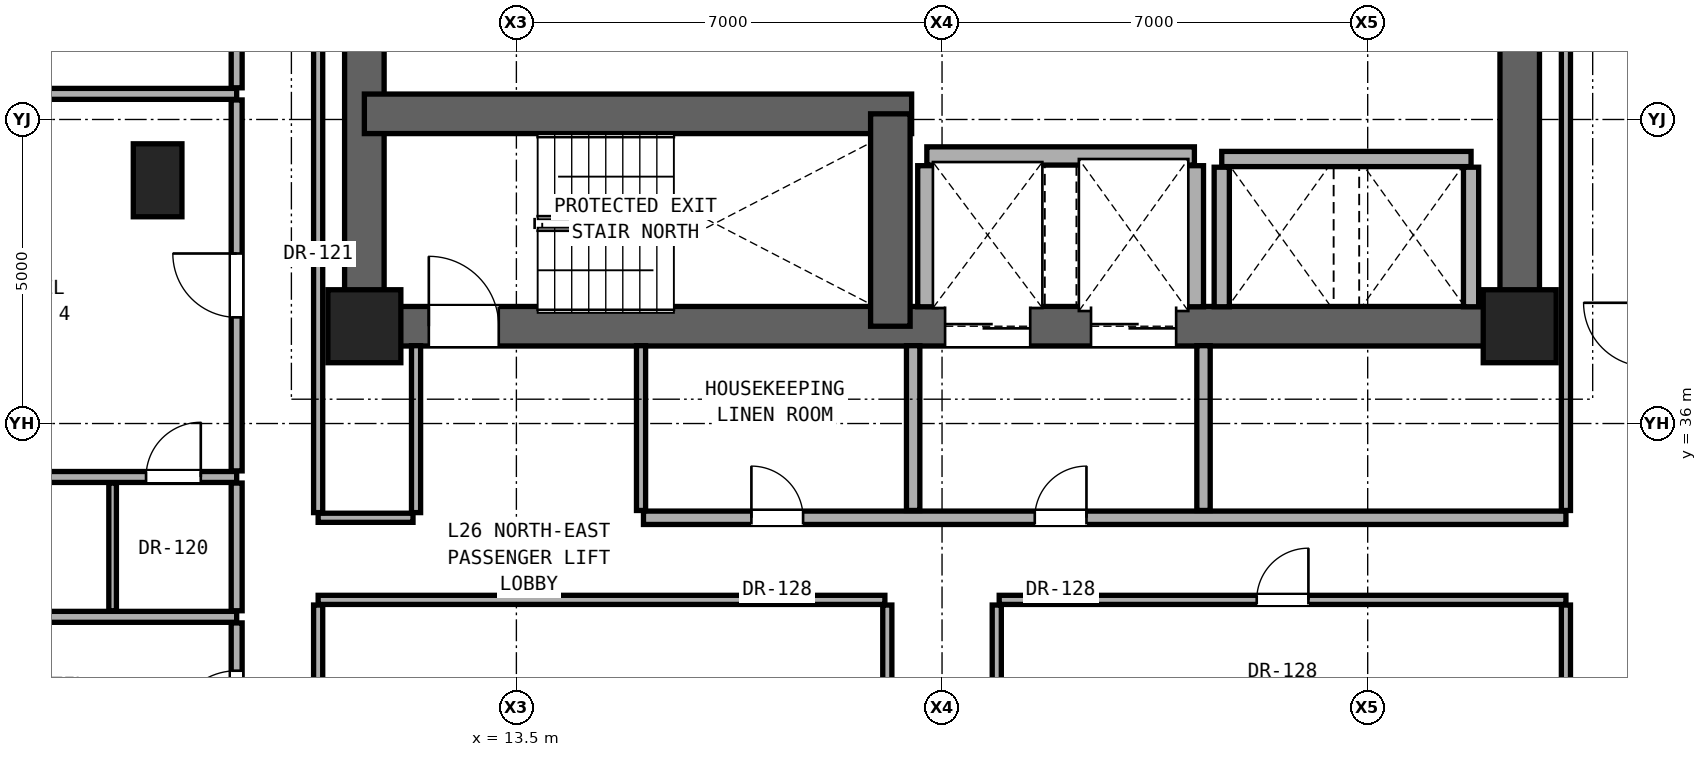
"""IFC4 building model, lengths in metres.
Left out: names, types, materials, properties, quantities, classifications, styles, units other than length and angle.
Written with IfcOpenShell. Run it as: python <this file> out.ifc"""

import sys

from ifc_helpers import new_model, si_unit, direction, frame, frame_2d, origin, origin_2d, place, context, subcontext, project, spatial, rectangle, extrude, element, fill, save


model = new_model("IFC4")
c1 = context("Model", 3, precision=1e-05, world=origin(), true_north=direction((0.0, 1.0)))
c2 = subcontext(c1, "Body", "Model", "MODEL_VIEW")
j1 = project(units=[si_unit("LENGTHUNIT", "METRE"), si_unit("PLANEANGLEUNIT", "RADIAN")], contexts=[c1])
p1 = place(None, origin())
s1 = spatial("IfcSite", under=j1, at=p1, CompositionType="ELEMENT")
p2 = place(p1, origin())
s2 = spatial("IfcBuilding", under=s1, at=p2, CompositionType="ELEMENT")
p3 = place(p2, frame((0.0, 0.0, 95.0)))
s3 = spatial("IfcBuildingStorey", under=s2, at=p3, CompositionType="ELEMENT", Elevation=95.0)
for number, where, z_axis, x_axis in (
    (1, (11.0, 37.6, 0.0), (0.0, 0.0, 1.0), (1.0, 0.0, 0.0)),
    (2, (30.0, 37.6, 0.0), (0.0, 0.0, 1.0), (1.0, 0.0, 0.0)),
):
    element("IfcColumn", number, at=place(p3, frame(where, z_axis=z_axis, x_axis=x_axis)), inside=s3, PredefinedType="COLUMN", context=c2, shape_type="SweptSolid", body=[
        extrude(rectangle(XDim=1.2, YDim=1.2, at=origin_2d()), origin(), (0.0, 0.0, 1.0), 3.3),
    ])
p4 = place(p3, frame((7.6, 40.0, 0.0), z_axis=(0.0, 0.0, 1.0), x_axis=(1.0, 0.0, 0.0)))
e3 = element("IfcColumn", 3, at=p4, inside=s3, PredefinedType="PILASTER", context=c2, shape_type="SweptSolid", body=[
    extrude(rectangle(XDim=0.8, YDim=1.2, at=origin_2d()), origin(), (0.0, 0.0, 1.0), 3.3),
])
for number, where, z_axis, x_axis in (
    (4, (11.0, 37.6, 0.0), (0.0, 0.0, 1.0), (0.0, 1.0, 0.0)),
    (5, (30.0, 37.6, 0.0), (0.0, 0.0, 1.0), (0.0, 1.0, 0.0)),
):
    element("IfcWall", number, at=place(p3, frame(where, z_axis=z_axis, x_axis=x_axis)), inside=s3, PredefinedType="SHEAR", context=c2, shape_type="SweptSolid", body=[
        extrude(rectangle(XDim=6.0, YDim=0.65, at=frame_2d((3.0, 0.0))), origin(), (0.0, 0.0, 1.0), 3.08),
    ])
p5 = place(p3, frame((11.0, 37.6, 0.0), z_axis=(0.0, 0.0, 1.0), x_axis=(1.0, 0.0, 0.0)))
e6 = element("IfcWall", 6, at=p5, inside=s3, PredefinedType="SHEAR", context=c2, shape_type="SweptSolid", body=[
    extrude(rectangle(XDim=19.0, YDim=0.65, at=frame_2d((9.5, 0.0))), origin(), (0.0, 0.0, 1.0), 3.08),
])
p6 = place(p5, frame((1.06, 0.0, 0.0)))
e7 = element("IfcOpeningElement", 7, at=p6, cuts=e6, PredefinedType="OPENING", context=c2, shape_type="SweptSolid", body=[
    extrude(rectangle(XDim=1.15, YDim=2.2, at=frame_2d((0.575, 1.1))), frame((0.0, 0.335, 0.0), z_axis=(0.0, -1.0, 0.0), x_axis=(1.0, 0.0, 0.0)), (0.0, 0.0, 1.0), 0.67),
])
p7 = place(p5, frame((9.55, 0.0, 0.0)))
e8 = element("IfcOpeningElement", 8, at=p7, cuts=e6, PredefinedType="OPENING", context=c2, shape_type="SweptSolid", body=[
    extrude(rectangle(XDim=1.4, YDim=2.35, at=frame_2d((0.7, 1.175))), frame((0.0, 0.335, 0.0), z_axis=(0.0, -1.0, 0.0), x_axis=(1.0, 0.0, 0.0)), (0.0, 0.0, 1.0), 0.67),
])
p8 = place(p5, frame((11.95, 0.0, 0.0)))
e9 = element("IfcOpeningElement", 9, at=p8, cuts=e6, PredefinedType="OPENING", context=c2, shape_type="SweptSolid", body=[
    extrude(rectangle(XDim=1.4, YDim=2.35, at=frame_2d((0.7, 1.175))), frame((0.0, 0.335, 0.0), z_axis=(0.0, -1.0, 0.0), x_axis=(1.0, 0.0, 0.0)), (0.0, 0.0, 1.0), 0.67),
])
p9 = place(p3, frame((11.0, 41.093, 0.0), z_axis=(0.0, 0.0, 1.0), x_axis=(1.0, 0.0, 0.0)))
e10 = element("IfcWall", 10, at=p9, inside=s3, PredefinedType="SHEAR", context=c2, shape_type="SweptSolid", body=[
    extrude(rectangle(XDim=9.0, YDim=0.65, at=frame_2d((4.5, 0.0))), origin(), (0.0, 0.0, 1.0), 3.08),
])
p10 = place(p3, frame((19.65, 37.6, 0.0), z_axis=(0.0, 0.0, 1.0), x_axis=(0.0, 1.0, 0.0)))
e11 = element("IfcWall", 11, at=p10, inside=s3, PredefinedType="SHEAR", context=c2, shape_type="SweptSolid", body=[
    extrude(rectangle(XDim=3.493, YDim=0.65, at=frame_2d((1.747, 0.0))), origin(), (0.0, 0.0, 1.0), 3.08),
])
p11 = place(p3, frame((-0.29, 32.821, 0.0), z_axis=(0.0, 0.0, 1.0), x_axis=(1.0, 0.0, 0.0)))
e12 = element("IfcWall", 12, at=p11, inside=s3, PredefinedType="PARTITIONING", context=c2, shape_type="SweptSolid", body=[
    extrude(rectangle(XDim=9.19, YDim=0.18, at=frame_2d((4.595, 0.0))), origin(), (0.0, 0.0, 1.0), 2.145),
])
p12 = place(p3, frame((10.24, 33.1, 0.0), z_axis=(0.0, 0.0, 1.0), x_axis=(1.0, 0.0, 0.0)))
e13 = element("IfcWall", 13, at=p12, inside=s3, PredefinedType="PARTITIONING", context=c2, shape_type="SweptSolid", body=[
    extrude(rectangle(XDim=9.32, YDim=0.15, at=frame_2d((4.66, 0.0))), origin(), (0.0, 0.0, 1.0), 2.124),
])
p13 = place(p3, frame((21.44, 33.1, 0.0), z_axis=(0.0, 0.0, 1.0), x_axis=(1.0, 0.0, 0.0)))
e14 = element("IfcWall", 14, at=p13, inside=s3, PredefinedType="PARTITIONING", context=c2, shape_type="SweptSolid", body=[
    extrude(rectangle(XDim=9.32, YDim=0.15, at=frame_2d((4.66, 0.0))), origin(), (0.0, 0.0, 1.0), 2.124),
])
p14 = place(p13, frame((4.235, 0.0, 0.0)))
e15 = element("IfcOpeningElement", 15, at=p14, cuts=e14, PredefinedType="OPENING", context=c2, shape_type="SweptSolid", body=[
    extrude(rectangle(XDim=0.85, YDim=2.01, at=frame_2d((0.425, 1.005))), frame((0.0, 0.085, 0.0), z_axis=(0.0, -1.0, 0.0), x_axis=(1.0, 0.0, 0.0)), (0.0, 0.0, 1.0), 0.17),
])
p15 = place(p3, frame((10.24, 34.45, 0.0), z_axis=(0.0, 0.0, 1.0), x_axis=(1.0, 0.0, 0.0)))
e16 = element("IfcWall", 16, at=p15, inside=s3, PredefinedType="PARTITIONING", context=c2, shape_type="SweptSolid", body=[
    extrude(rectangle(XDim=1.56, YDim=0.15, at=frame_2d((0.78, 0.0))), origin(), (0.0, 0.0, 1.0), 2.124),
])
p16 = place(p3, frame((15.59, 34.45, 0.0), z_axis=(0.0, 0.0, 1.0), x_axis=(1.0, 0.0, 0.0)))
e17 = element("IfcWall", 17, at=p16, inside=s3, PredefinedType="SOLIDWALL", context=c2, shape_type="SweptSolid", body=[
    extrude(rectangle(XDim=15.17, YDim=0.22, at=frame_2d((7.585, 0.0))), origin(), (0.0, 0.0, 1.0), 2.124),
])
p17 = place(p16, frame((6.435, 0.0, 0.0)))
e18 = element("IfcOpeningElement", 18, at=p17, cuts=e17, PredefinedType="OPENING", context=c2, shape_type="SweptSolid", body=[
    extrude(rectangle(XDim=0.85, YDim=2.01, at=frame_2d((0.425, 1.005))), frame((0.0, 0.12, 0.0), z_axis=(0.0, -1.0, 0.0), x_axis=(1.0, 0.0, 0.0)), (0.0, 0.0, 1.0), 0.24),
])
p18 = place(p16, frame((1.775, 0.0, 0.0)))
e19 = element("IfcOpeningElement", 19, at=p18, cuts=e17, PredefinedType="OPENING", context=c2, shape_type="SweptSolid", body=[
    extrude(rectangle(XDim=0.85, YDim=2.01, at=frame_2d((0.425, 1.005))), frame((0.0, 0.12, 0.0), z_axis=(0.0, -1.0, 0.0), x_axis=(1.0, 0.0, 0.0)), (0.0, 0.0, 1.0), 0.24),
])
p19 = place(p3, frame((-0.29, 35.121, 0.0), z_axis=(0.0, 0.0, 1.0), x_axis=(1.0, 0.0, 0.0)))
e20 = element("IfcWall", 20, at=p19, inside=s3, PredefinedType="PARTITIONING", context=c2, shape_type="SweptSolid", body=[
    extrude(rectangle(XDim=9.19, YDim=0.18, at=frame_2d((4.595, 0.0))), origin(), (0.0, 0.0, 1.0), 2.145),
])
p20 = place(p19, frame((3.17, 0.0, 0.0)))
e21 = element("IfcOpeningElement", 21, at=p20, cuts=e20, PredefinedType="OPENING", context=c2, shape_type="SweptSolid", body=[
    extrude(rectangle(XDim=0.85, YDim=2.01, at=frame_2d((0.425, 1.005))), frame((0.0, 0.1, 0.0), z_axis=(0.0, -1.0, 0.0), x_axis=(1.0, 0.0, 0.0)), (0.0, 0.0, 1.0), 0.2),
])
p21 = place(p19, frame((7.7, 0.0, 0.0)))
e22 = element("IfcOpeningElement", 22, at=p21, cuts=e20, PredefinedType="OPENING", context=c2, shape_type="SweptSolid", body=[
    extrude(rectangle(XDim=0.9, YDim=2.1, at=frame_2d((0.45, 1.05))), frame((0.0, 0.1, 0.0), z_axis=(0.0, -1.0, 0.0), x_axis=(1.0, 0.0, 0.0)), (0.0, 0.0, 1.0), 0.2),
])
p22 = place(p3, frame((25.1, 40.35, 0.0), z_axis=(0.0, 0.0, 1.0), x_axis=(1.0, 0.0, 0.0)))
e23 = element("IfcWall", 23, at=p22, inside=s3, PredefinedType="SOLIDWALL", context=c2, shape_type="SweptSolid", body=[
    extrude(rectangle(XDim=4.1, YDim=0.25, at=frame_2d((2.05, 0.0))), origin(), (0.0, 0.0, 1.0), 3.08),
])
p23 = place(p3, frame((20.25, 40.4, 0.0), z_axis=(0.0, 0.0, 1.0), x_axis=(1.0, 0.0, 0.0)))
e24 = element("IfcWall", 24, at=p23, inside=s3, PredefinedType="SOLIDWALL", context=c2, shape_type="SweptSolid", body=[
    extrude(rectangle(XDim=4.4, YDim=0.3, at=frame_2d((2.2, 0.0))), origin(), (0.0, 0.0, 1.0), 3.08),
])
p24 = place(p3, frame((5.035, 41.421, 0.0), z_axis=(0.0, 0.0, 1.0), x_axis=(1.0, 0.0, 0.0)))
e25 = element("IfcWall", 25, at=p24, inside=s3, PredefinedType="PARTITIONING", context=c2, shape_type="SweptSolid", body=[
    extrude(rectangle(XDim=3.865, YDim=0.18, at=frame_2d((1.933, 0.0))), origin(), (0.0, 0.0, 1.0), 3.08),
])
p25 = place(p3, frame((6.86, 32.921, 0.0), z_axis=(0.0, 0.0, 1.0), x_axis=(0.0, 1.0, 0.0)))
e26 = element("IfcWall", 26, at=p25, inside=s3, PredefinedType="PARTITIONING", context=c2, shape_type="SweptSolid", body=[
    extrude(rectangle(XDim=2.1, YDim=0.125, at=frame_2d((1.05, 0.0))), origin(), (0.0, 0.0, 1.0), 3.08),
])
p26 = place(p3, frame((8.9, 30.099, 0.0), z_axis=(0.0, 0.0, 1.0), x_axis=(0.0, 1.0, 0.0)))
e27 = element("IfcWall", 27, at=p26, inside=s3, PredefinedType="PARTITIONING", context=c2, shape_type="SweptSolid", body=[
    extrude(rectangle(XDim=2.622, YDim=0.18, at=frame_2d((1.311, 0.0))), origin(), (0.0, 0.0, 1.0), 2.299),
])
p27 = place(p26, frame((0.786, 0.0, 0.0)))
e28 = element("IfcOpeningElement", 28, at=p27, cuts=e27, PredefinedType="OPENING", context=c2, shape_type="SweptSolid", body=[
    extrude(rectangle(XDim=1.05, YDim=2.2, at=frame_2d((0.525, 1.1))), frame((0.0, 0.1, 0.0), z_axis=(0.0, -1.0, 0.0), x_axis=(1.0, 0.0, 0.0)), (0.0, 0.0, 1.0), 0.2),
])
p28 = place(p3, frame((8.9, 32.921, 0.0), z_axis=(0.0, 0.0, 1.0), x_axis=(0.0, 1.0, 0.0)))
e29 = element("IfcWall", 29, at=p28, inside=s3, PredefinedType="PARTITIONING", context=c2, shape_type="SweptSolid", body=[
    extrude(rectangle(XDim=2.1, YDim=0.18, at=frame_2d((1.05, 0.0))), origin(), (0.0, 0.0, 1.0), 3.08),
])
p29 = place(p3, frame((8.9, 35.221, 0.0), z_axis=(0.0, 0.0, 1.0), x_axis=(0.0, 1.0, 0.0)))
e30 = element("IfcWall", 30, at=p29, inside=s3, PredefinedType="PARTITIONING", context=c2, shape_type="SweptSolid", body=[
    extrude(rectangle(XDim=6.1, YDim=0.18, at=frame_2d((3.05, 0.0))), origin(), (0.0, 0.0, 1.0), 2.456),
])
p30 = place(p29, frame((2.525, 0.0, 0.0)))
e31 = element("IfcOpeningElement", 31, at=p30, cuts=e30, PredefinedType="OPENING", context=c2, shape_type="SweptSolid", body=[
    extrude(rectangle(XDim=1.05, YDim=2.2, at=frame_2d((0.525, 1.1))), frame((0.0, 0.1, 0.0), z_axis=(0.0, -1.0, 0.0), x_axis=(1.0, 0.0, 0.0)), (0.0, 0.0, 1.0), 0.2),
])
p31 = place(p3, frame((8.9, 41.521, 0.0), z_axis=(0.0, 0.0, 1.0), x_axis=(0.0, 1.0, 0.0)))
e32 = element("IfcWall", 32, at=p31, inside=s3, PredefinedType="PARTITIONING", context=c2, shape_type="SweptSolid", body=[
    extrude(rectangle(XDim=5.205, YDim=0.18, at=frame_2d((2.603, 0.0))), origin(), (0.0, 0.0, 1.0), 3.08),
])
p32 = place(p31, frame((2.127, 0.0, 0.0)))
e33 = element("IfcOpeningElement", 33, at=p32, cuts=e32, PredefinedType="OPENING", context=c2, shape_type="SweptSolid", body=[
    extrude(rectangle(XDim=0.95, YDim=2.15, at=frame_2d((0.475, 1.075))), frame((0.0, 0.1, 0.0), z_axis=(0.0, -1.0, 0.0), x_axis=(1.0, 0.0, 0.0)), (0.0, 0.0, 1.0), 0.2),
])
p33 = place(p3, frame((10.24, 27.485, 0.0), z_axis=(0.0, 0.0, 1.0), x_axis=(0.0, 1.0, 0.0)))
e34 = element("IfcWall", 34, at=p33, inside=s3, PredefinedType="PARTITIONING", context=c2, shape_type="SweptSolid", body=[
    extrude(rectangle(XDim=5.53, YDim=0.15, at=frame_2d((2.765, 0.0))), origin(), (0.0, 0.0, 1.0), 2.299),
])
p34 = place(p33, frame((2.29, 0.0, 0.0)))
e35 = element("IfcOpeningElement", 35, at=p34, cuts=e34, PredefinedType="OPENING", context=c2, shape_type="SweptSolid", body=[
    extrude(rectangle(XDim=0.95, YDim=2.15, at=frame_2d((0.475, 1.075))), frame((0.0, 0.085, 0.0), z_axis=(0.0, -1.0, 0.0), x_axis=(1.0, 0.0, 0.0)), (0.0, 0.0, 1.0), 0.17),
])
p35 = place(p3, frame((10.24, 34.535, 0.0), z_axis=(0.0, 0.0, 1.0), x_axis=(0.0, 1.0, 0.0)))
e36 = element("IfcWall", 36, at=p35, inside=s3, PredefinedType="PARTITIONING", context=c2, shape_type="SweptSolid", body=[
    extrude(rectangle(XDim=9.13, YDim=0.15, at=frame_2d((4.565, 0.0))), origin(), (0.0, 0.0, 1.0), 2.456),
])
p36 = place(p3, frame((11.85, 34.535, 0.0), z_axis=(0.0, 0.0, 1.0), x_axis=(0.0, 1.0, 0.0)))
e37 = element("IfcWall", 37, at=p36, inside=s3, PredefinedType="PARTITIONING", context=c2, shape_type="SweptSolid", body=[
    extrude(rectangle(XDim=2.745, YDim=0.15, at=frame_2d((1.373, 0.0))), origin(), (0.0, 0.0, 1.0), 3.08),
])
p37 = place(p3, frame((15.55, 34.57, 0.0), z_axis=(0.0, 0.0, 1.0), x_axis=(0.0, 1.0, 0.0)))
e38 = element("IfcWall", 38, at=p37, inside=s3, PredefinedType="PARTITIONING", context=c2, shape_type="SweptSolid", body=[
    extrude(rectangle(XDim=2.71, YDim=0.15, at=frame_2d((1.355, 0.0))), origin(), (0.0, 0.0, 1.0), 2.609),
])
p38 = place(p3, frame((19.6, 27.485, 0.0), z_axis=(0.0, 0.0, 1.0), x_axis=(0.0, 1.0, 0.0)))
e39 = element("IfcWall", 39, at=p38, inside=s3, PredefinedType="PARTITIONING", context=c2, shape_type="SweptSolid", body=[
    extrude(rectangle(XDim=5.53, YDim=0.15, at=frame_2d((2.765, 0.0))), origin(), (0.0, 0.0, 1.0), 2.124),
])
p39 = place(p3, frame((20.025, 34.57, 0.0), z_axis=(0.0, 0.0, 1.0), x_axis=(0.0, 1.0, 0.0)))
e40 = element("IfcWall", 40, at=p39, inside=s3, PredefinedType="SOLIDWALL", context=c2, shape_type="SweptSolid", body=[
    extrude(rectangle(XDim=2.71, YDim=0.22, at=frame_2d((1.355, 0.0))), origin(), (0.0, 0.0, 1.0), 3.08),
])
p40 = place(p3, frame((20.25, 37.92, 0.0), z_axis=(0.0, 0.0, 1.0), x_axis=(0.0, 1.0, 0.0)))
e41 = element("IfcWall", 41, at=p40, inside=s3, PredefinedType="SOLIDWALL", context=c2, shape_type="SweptSolid", body=[
    extrude(rectangle(XDim=2.32, YDim=0.3, at=frame_2d((1.16, 0.0))), origin(), (0.0, 0.0, 1.0), 3.08),
])
p41 = place(p3, frame((21.4, 27.485, 0.0), z_axis=(0.0, 0.0, 1.0), x_axis=(0.0, 1.0, 0.0)))
e42 = element("IfcWall", 42, at=p41, inside=s3, PredefinedType="PARTITIONING", context=c2, shape_type="SweptSolid", body=[
    extrude(rectangle(XDim=5.53, YDim=0.15, at=frame_2d((2.765, 0.0))), origin(), (0.0, 0.0, 1.0), 2.124),
])
p42 = place(p3, frame((24.65, 37.92, 0.0), z_axis=(0.0, 0.0, 1.0), x_axis=(0.0, 1.0, 0.0)))
e43 = element("IfcWall", 43, at=p42, inside=s3, PredefinedType="SOLIDWALL", context=c2, shape_type="SweptSolid", body=[
    extrude(rectangle(XDim=2.32, YDim=0.3, at=frame_2d((1.16, 0.0))), origin(), (0.0, 0.0, 1.0), 3.08),
])
p43 = place(p3, frame((24.8, 34.57, 0.0), z_axis=(0.0, 0.0, 1.0), x_axis=(0.0, 1.0, 0.0)))
e44 = element("IfcWall", 44, at=p43, inside=s3, PredefinedType="SOLIDWALL", context=c2, shape_type="SweptSolid", body=[
    extrude(rectangle(XDim=2.71, YDim=0.22, at=frame_2d((1.355, 0.0))), origin(), (0.0, 0.0, 1.0), 3.08),
])
for number, where, z_axis, x_axis in (
    (45, (25.1, 37.92, 0.0), (0.0, 0.0, 1.0), (0.0, 1.0, 0.0)),
    (46, (29.2, 37.92, 0.0), (0.0, 0.0, 1.0), (0.0, 1.0, 0.0)),
):
    element("IfcWall", number, at=place(p3, frame(where, z_axis=z_axis, x_axis=x_axis)), inside=s3, PredefinedType="SOLIDWALL", context=c2, shape_type="SweptSolid", body=[
        extrude(rectangle(XDim=2.295, YDim=0.25, at=frame_2d((1.147, 0.0))), origin(), (0.0, 0.0, 1.0), 3.08),
    ])
p44 = place(p3, frame((30.76, 27.485, 0.0), z_axis=(0.0, 0.0, 1.0), x_axis=(0.0, 1.0, 0.0)))
e47 = element("IfcWall", 47, at=p44, inside=s3, PredefinedType="PARTITIONING", context=c2, shape_type="SweptSolid", body=[
    extrude(rectangle(XDim=5.53, YDim=0.15, at=frame_2d((2.765, 0.0))), origin(), (0.0, 0.0, 1.0), 2.299),
])
p45 = place(p3, frame((30.76, 34.57, 0.0), z_axis=(0.0, 0.0, 1.0), x_axis=(0.0, 1.0, 0.0)))
e48 = element("IfcWall", 48, at=p45, inside=s3, PredefinedType="PARTITIONING", context=c2, shape_type="SweptSolid", body=[
    extrude(rectangle(XDim=9.095, YDim=0.15, at=frame_2d((4.547, 0.0))), origin(), (0.0, 0.0, 1.0), 2.456),
])
p46 = place(p6, origin())
e49 = element("IfcDoor", 49, at=p46, inside=s3, OperationType="SINGLE_SWING_LEFT", PredefinedType="DOOR", context=c2, shape_type="SweptSolid", body=[
    extrude(rectangle(XDim=1.15, YDim=2.2, at=frame_2d((0.575, 1.1))), frame((0.0, 0.025, 0.0), z_axis=(0.0, -1.0, 0.0), x_axis=(1.0, 0.0, 0.0)), (0.0, 0.0, 1.0), 0.05),
])
fill(e7, e49)
p47 = place(p17, origin())
e50 = element("IfcDoor", 50, at=p47, inside=s3, OperationType="SINGLE_SWING_RIGHT", PredefinedType="DOOR", context=c2, shape_type="SweptSolid", body=[
    extrude(rectangle(XDim=0.85, YDim=2.01, at=frame_2d((0.425, 1.005))), frame((0.0, 0.025, 0.0), z_axis=(0.0, -1.0, 0.0), x_axis=(1.0, 0.0, 0.0)), (0.0, 0.0, 1.0), 0.05),
])
fill(e18, e50)
p48 = place(p18, origin())
e51 = element("IfcDoor", 51, at=p48, inside=s3, OperationType="SINGLE_SWING_LEFT", PredefinedType="DOOR", context=c2, shape_type="SweptSolid", body=[
    extrude(rectangle(XDim=0.85, YDim=2.01, at=frame_2d((0.425, 1.005))), frame((0.0, 0.025, 0.0), z_axis=(0.0, -1.0, 0.0), x_axis=(1.0, 0.0, 0.0)), (0.0, 0.0, 1.0), 0.05),
])
fill(e19, e51)
p49 = place(p27, origin())
e52 = element("IfcDoor", 52, at=p49, inside=s3, OperationType="SINGLE_SWING_LEFT", PredefinedType="DOOR", context=c2, shape_type="SweptSolid", body=[
    extrude(rectangle(XDim=1.05, YDim=2.2, at=frame_2d((0.525, 1.1))), frame((0.0, 0.025, 0.0), z_axis=(0.0, -1.0, 0.0), x_axis=(1.0, 0.0, 0.0)), (0.0, 0.0, 1.0), 0.05),
])
fill(e28, e52)
p50 = place(p30, origin())
e53 = element("IfcDoor", 53, at=p50, inside=s3, OperationType="SINGLE_SWING_RIGHT", PredefinedType="DOOR", context=c2, shape_type="SweptSolid", body=[
    extrude(rectangle(XDim=1.05, YDim=2.2, at=frame_2d((0.525, 1.1))), frame((0.0, 0.025, 0.0), z_axis=(0.0, -1.0, 0.0), x_axis=(1.0, 0.0, 0.0)), (0.0, 0.0, 1.0), 0.05),
])
fill(e31, e53)
p51 = place(p21, origin())
e54 = element("IfcDoor", 54, at=p51, inside=s3, OperationType="SINGLE_SWING_RIGHT", PredefinedType="DOOR", context=c2, shape_type="SweptSolid", body=[
    extrude(rectangle(XDim=0.9, YDim=2.1, at=frame_2d((0.45, 1.05))), frame((0.0, 0.025, 0.0), z_axis=(0.0, -1.0, 0.0), x_axis=(1.0, 0.0, 0.0)), (0.0, 0.0, 1.0), 0.05),
])
fill(e22, e54)
p52 = place(p14, origin())
e55 = element("IfcDoor", 55, at=p52, inside=s3, OperationType="SINGLE_SWING_RIGHT", PredefinedType="DOOR", context=c2, shape_type="SweptSolid", body=[
    extrude(rectangle(XDim=0.85, YDim=2.01, at=frame_2d((0.425, 1.005))), frame((0.0, 0.025, 0.0), z_axis=(0.0, -1.0, 0.0), x_axis=(1.0, 0.0, 0.0)), (0.0, 0.0, 1.0), 0.05),
])
fill(e15, e55)
p53 = place(p7, origin())
e56 = element("IfcDoor", 56, at=p53, inside=s3, OperationType="DOUBLE_DOOR_SLIDING", PredefinedType="DOOR", context=c2, shape_type="SweptSolid", body=[
    extrude(rectangle(XDim=1.4, YDim=2.35, at=frame_2d((0.7, 1.175))), frame((0.0, 0.025, 0.0), z_axis=(0.0, -1.0, 0.0), x_axis=(1.0, 0.0, 0.0)), (0.0, 0.0, 1.0), 0.05),
])
fill(e8, e56)
p54 = place(p8, origin())
e57 = element("IfcDoor", 57, at=p54, inside=s3, OperationType="DOUBLE_DOOR_SLIDING", PredefinedType="DOOR", context=c2, shape_type="SweptSolid", body=[
    extrude(rectangle(XDim=1.4, YDim=2.35, at=frame_2d((0.7, 1.175))), frame((0.0, 0.025, 0.0), z_axis=(0.0, -1.0, 0.0), x_axis=(1.0, 0.0, 0.0)), (0.0, 0.0, 1.0), 0.05),
])
fill(e9, e57)
save(model, sys.argv[1])
